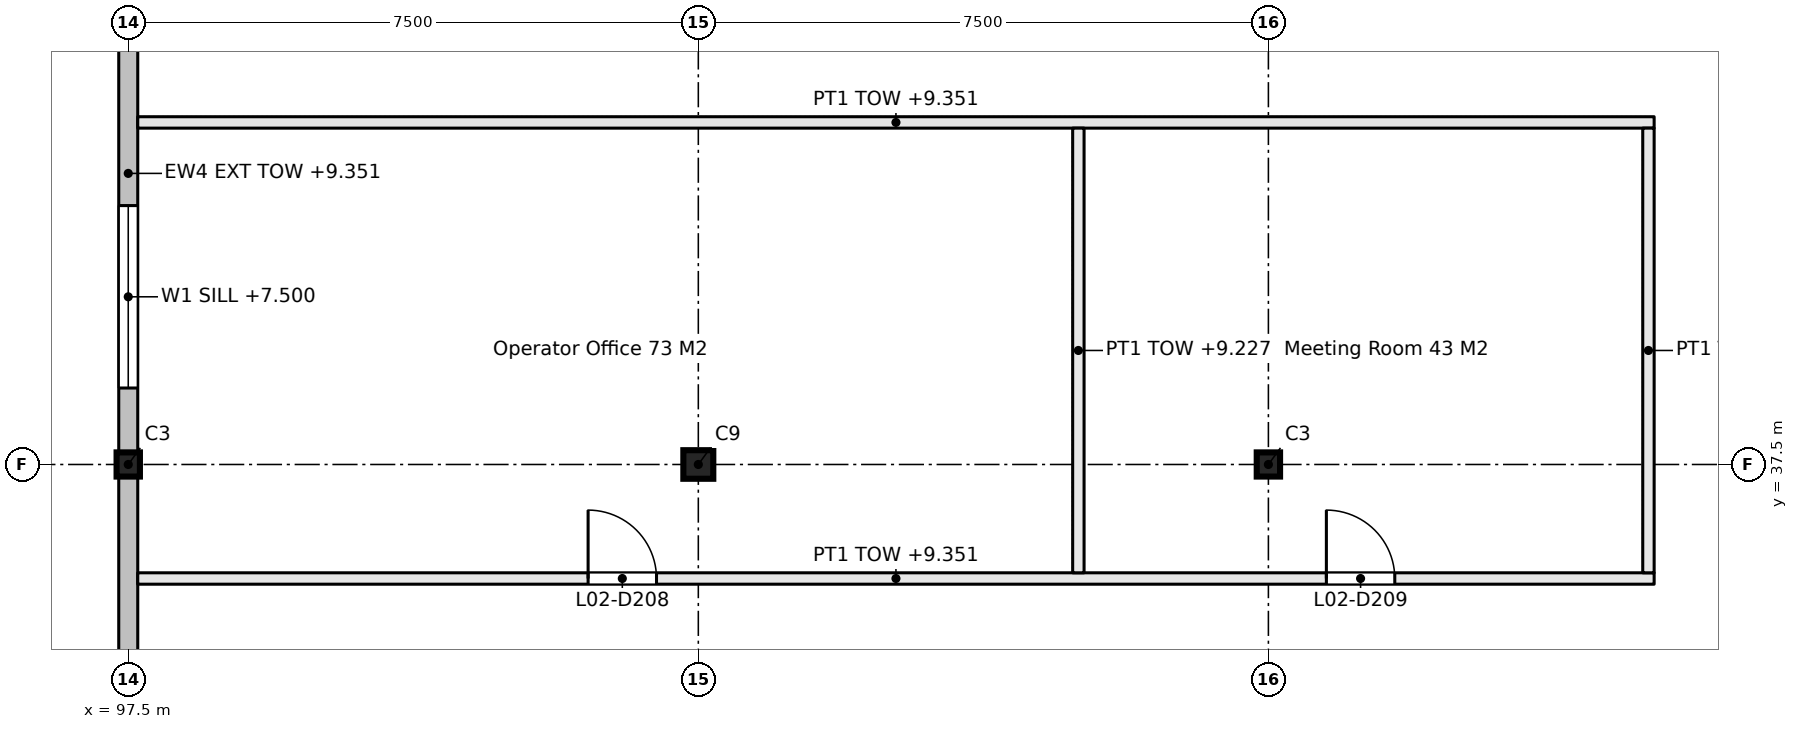
"""IFC4 building model, lengths in metres.
Left out: names, types, materials, properties, quantities, classifications, styles, units other than length and angle.
Written with IfcOpenShell. Run it as: python <this file> out.ifc"""

import sys

from ifc_helpers import new_model, si_unit, direction, frame, frame_2d, origin, origin_2d, place, context, subcontext, project, spatial, rectangle, i_section, extrude, element, fill, save


model = new_model("IFC4")
c1 = context("Model", 3, precision=1e-05, world=origin(), true_north=direction((0.0, 1.0)))
c2 = subcontext(c1, "Body", "Model", "MODEL_VIEW")
j1 = project(units=[si_unit("LENGTHUNIT", "METRE"), si_unit("PLANEANGLEUNIT", "RADIAN")], contexts=[c1])
p1 = place(None, origin())
s1 = spatial("IfcSite", under=j1, at=p1, CompositionType="ELEMENT")
p2 = place(p1, origin())
s2 = spatial("IfcBuilding", under=s1, at=p2, CompositionType="ELEMENT")
p3 = place(p2, frame((0.0, 0.0, 6.6)))
s3 = spatial("IfcBuildingStorey", under=s2, at=p3, CompositionType="ELEMENT", Elevation=6.6)
p4 = place(p3, frame((97.5, 37.5, 0.0), z_axis=(0.0, 0.0, 1.0), x_axis=(1.0, 0.0, 0.0)))
e1 = element("IfcColumn", 1, at=p4, inside=s3, PredefinedType="COLUMN", context=c2, shape_type="SweptSolid", body=[
    extrude(i_section(OverallWidth=0.307, OverallDepth=0.318, WebThickness=0.013, FlangeThickness=0.021, FilletRadius=0.015, at=origin_2d()), origin(), (0.0, 0.0, 1.0), 3.3),
])
p5 = place(p3, frame((105.0, 37.5, 0.0), z_axis=(0.0, 0.0, 1.0), x_axis=(1.0, 0.0, 0.0)))
e2 = element("IfcColumn", 2, at=p5, inside=s3, PredefinedType="COLUMN", context=c2, shape_type="SweptSolid", body=[
    extrude(i_section(OverallWidth=0.394, OverallDepth=0.376, WebThickness=0.017, FlangeThickness=0.028, FilletRadius=0.015, at=origin_2d()), origin(), (0.0, 0.0, 1.0), 3.3),
])
p6 = place(p3, frame((112.5, 37.5, 0.0), z_axis=(0.0, 0.0, 1.0), x_axis=(1.0, 0.0, 0.0)))
e3 = element("IfcColumn", 3, at=p6, inside=s3, PredefinedType="COLUMN", context=c2, shape_type="SweptSolid", body=[
    extrude(i_section(OverallWidth=0.307, OverallDepth=0.318, WebThickness=0.013, FlangeThickness=0.021, FilletRadius=0.015, at=origin_2d()), origin(), (0.0, 0.0, 1.0), 3.3),
])
p7 = place(p3, frame((97.625, 36.0, 0.0), z_axis=(0.0, 0.0, 1.0), x_axis=(1.0, 0.0, 0.0)))
e4 = element("IfcWall", 4, at=p7, inside=s3, PredefinedType="PARTITIONING", context=c2, shape_type="SweptSolid", body=[
    extrude(rectangle(XDim=19.95, YDim=0.15, at=frame_2d((9.975, 0.0))), origin(), (0.0, 0.0, 1.0), 2.751),
])
p8 = place(p7, frame((5.925, 0.0, 0.0)))
e5 = element("IfcOpeningElement", 5, at=p8, cuts=e4, PredefinedType="OPENING", context=c2, shape_type="SweptSolid", body=[
    extrude(rectangle(XDim=0.9, YDim=2.1, at=frame_2d((0.45, 1.05))), frame((0.0, 0.085, 0.0), z_axis=(0.0, -1.0, 0.0), x_axis=(1.0, 0.0, 0.0)), (0.0, 0.0, 1.0), 0.17),
])
p9 = place(p7, frame((15.638, 0.0, 0.0)))
e6 = element("IfcOpeningElement", 6, at=p9, cuts=e4, PredefinedType="OPENING", context=c2, shape_type="SweptSolid", body=[
    extrude(rectangle(XDim=0.9, YDim=2.1, at=frame_2d((0.45, 1.05))), frame((0.0, 0.085, 0.0), z_axis=(0.0, -1.0, 0.0), x_axis=(1.0, 0.0, 0.0)), (0.0, 0.0, 1.0), 0.17),
])
p10 = place(p3, frame((97.625, 42.0, 0.0), z_axis=(0.0, 0.0, 1.0), x_axis=(1.0, 0.0, 0.0)))
e7 = element("IfcWall", 7, at=p10, inside=s3, PredefinedType="PARTITIONING", context=c2, shape_type="SweptSolid", body=[
    extrude(rectangle(XDim=19.95, YDim=0.15, at=frame_2d((9.975, 0.0))), origin(), (0.0, 0.0, 1.0), 2.751),
])
for number, where, z_axis, x_axis in (
    (8, (110.0, 36.075, 0.0), (0.0, 0.0, 1.0), (0.0, 1.0, 0.0)),
    (9, (117.5, 36.075, 0.0), (0.0, 0.0, 1.0), (0.0, 1.0, 0.0)),
):
    element("IfcWall", number, at=place(p3, frame(where, z_axis=z_axis, x_axis=x_axis)), inside=s3, PredefinedType="PARTITIONING", context=c2, shape_type="SweptSolid", body=[
        extrude(rectangle(XDim=5.85, YDim=0.15, at=frame_2d((2.925, 0.0))), origin(), (0.0, 0.0, 1.0), 2.627),
    ])
p11 = place(p3, frame((97.5, 30.154, 0.0), z_axis=(0.0, 0.0, 1.0), x_axis=(0.0, 1.0, 0.0)))
e10 = element("IfcWall", 10, at=p11, inside=s3, PredefinedType="SOLIDWALL", context=c2, shape_type="SweptSolid", body=[
    extrude(rectangle(XDim=7.188, YDim=0.25, at=frame_2d((3.594, 0.0))), origin(), (0.0, 0.0, 1.0), 2.751),
])
p12 = place(p3, frame((97.5, 37.659, 0.0), z_axis=(0.0, 0.0, 1.0), x_axis=(0.0, 1.0, 0.0)))
e11 = element("IfcWall", 11, at=p12, inside=s3, PredefinedType="SOLIDWALL", context=c2, shape_type="SweptSolid", body=[
    extrude(rectangle(XDim=7.341, YDim=0.25, at=frame_2d((3.67, 0.0))), origin(), (0.0, 0.0, 1.0), 2.751),
])
p13 = place(p12, frame((0.847, 0.0, 0.9)))
e12 = element("IfcOpeningElement", 12, at=p13, cuts=e11, PredefinedType="OPENING", context=c2, shape_type="SweptSolid", body=[
    extrude(rectangle(XDim=2.4, YDim=1.5, at=frame_2d((1.2, 0.75))), frame((0.0, 0.135, 0.0), z_axis=(0.0, -1.0, 0.0), x_axis=(1.0, 0.0, 0.0)), (0.0, 0.0, 1.0), 0.27),
])
p14 = place(p8, origin())
e13 = element("IfcDoor", 13, at=p14, inside=s3, OperationType="SINGLE_SWING_LEFT", PredefinedType="DOOR", context=c2, shape_type="SweptSolid", body=[
    extrude(rectangle(XDim=0.9, YDim=2.1, at=frame_2d((0.45, 1.05))), frame((0.0, 0.025, 0.0), z_axis=(0.0, -1.0, 0.0), x_axis=(1.0, 0.0, 0.0)), (0.0, 0.0, 1.0), 0.05),
])
fill(e5, e13)
p15 = place(p9, origin())
e14 = element("IfcDoor", 14, at=p15, inside=s3, OperationType="SINGLE_SWING_RIGHT", PredefinedType="DOOR", context=c2, shape_type="SweptSolid", body=[
    extrude(rectangle(XDim=0.9, YDim=2.1, at=frame_2d((0.45, 1.05))), frame((0.0, 0.025, 0.0), z_axis=(0.0, -1.0, 0.0), x_axis=(1.0, 0.0, 0.0)), (0.0, 0.0, 1.0), 0.05),
])
fill(e6, e14)
p16 = place(p13, origin())
e15 = element("IfcWindow", 15, at=p16, inside=s3, PartitioningType="DOUBLE_PANEL_VERTICAL", PredefinedType="WINDOW", context=c2, shape_type="SweptSolid", body=[
    extrude(rectangle(XDim=2.4, YDim=1.5, at=frame_2d((1.2, 0.75))), frame((0.0, 0.03, 0.0), z_axis=(0.0, -1.0, 0.0), x_axis=(1.0, 0.0, 0.0)), (0.0, 0.0, 1.0), 0.06),
])
fill(e12, e15)
save(model, sys.argv[1])
